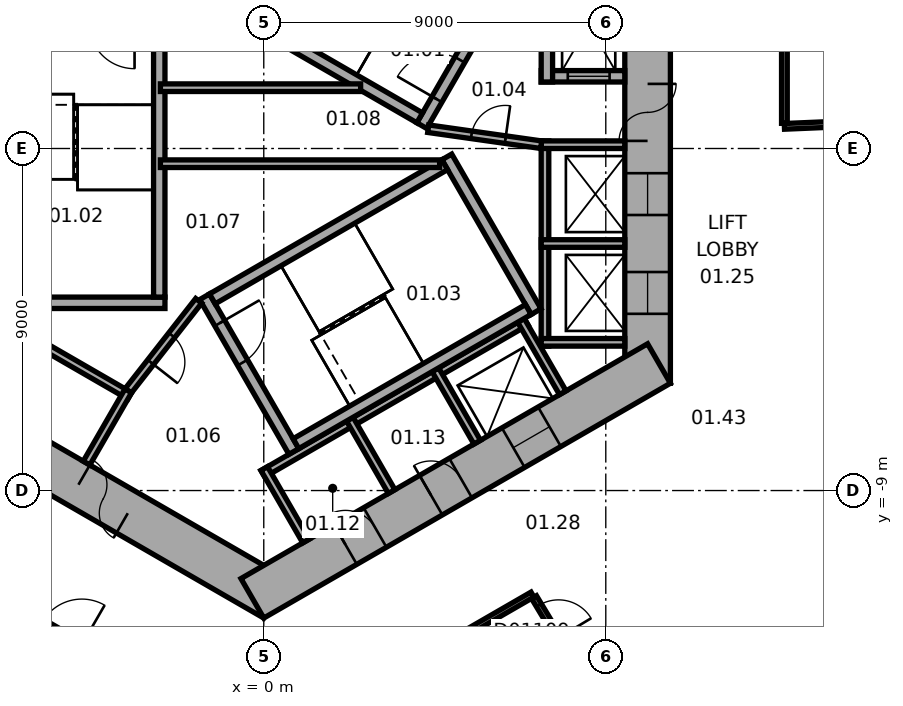
"""IFC4 building model, lengths in metres.
Left out: names, types, materials, properties, quantities, classifications, styles, units other than length and angle.
Written with IfcOpenShell. Run it as: python <this file> out.ifc"""

import sys

from ifc_helpers import new_model, si_unit, direction, frame, frame_2d, origin, place, context, subcontext, project, spatial, rectangle, extrude, element, fill, save


model = new_model("IFC4")
c1 = context("Model", 3, precision=1e-05, world=origin(), true_north=direction((0.0, 1.0)))
c2 = subcontext(c1, "Body", "Model", "MODEL_VIEW")
j1 = project(units=[si_unit("LENGTHUNIT", "METRE"), si_unit("PLANEANGLEUNIT", "RADIAN")], contexts=[c1])
p1 = place(None, origin())
s1 = spatial("IfcSite", under=j1, at=p1, CompositionType="ELEMENT")
p2 = place(p1, origin())
s2 = spatial("IfcBuilding", under=s1, at=p2, CompositionType="ELEMENT")
p3 = place(p2, frame((0.0, 0.0, 7.5)))
s3 = spatial("IfcBuildingStorey", under=s2, at=p3, CompositionType="ELEMENT", Elevation=7.5)
p4 = place(p3, frame((10.1, -6.177, 0.0), z_axis=(0.0, 0.0, 1.0), x_axis=(0.0, 1.0, 0.0)))
e1 = element("IfcWall", 1, at=p4, inside=s3, PredefinedType="SHEAR", context=c2, shape_type="SweptSolid", body=[
    extrude(rectangle(XDim=12.355, YDim=1.2, at=frame_2d((6.177, 0.0))), origin(), (0.0, 0.0, 1.0), 5.5),
])
p5 = place(p4, frame((6.378, 0.0, 0.0)))
e2 = element("IfcOpeningElement", 2, at=p5, cuts=e1, PredefinedType="OPENING", context=c2, shape_type="SweptSolid", body=[
    extrude(rectangle(XDim=1.5, YDim=2.1, at=frame_2d((0.75, 1.05))), frame((0.0, 0.61, 0.0), z_axis=(0.0, -1.0, 0.0), x_axis=(1.0, 0.0, 0.0)), (0.0, 0.0, 1.0), 1.22),
])
p6 = place(p4, frame((1.828, 0.0, 0.0)))
e3 = element("IfcOpeningElement", 3, at=p6, cuts=e1, PredefinedType="OPENING", context=c2, shape_type="SweptSolid", body=[
    extrude(rectangle(XDim=1.1, YDim=2.1, at=frame_2d((0.55, 1.05))), frame((0.0, 0.61, 0.0), z_axis=(0.0, -1.0, 0.0), x_axis=(1.0, 0.0, 0.0)), (0.0, 0.0, 1.0), 1.22),
])
p7 = place(p4, frame((4.427, 0.0, 0.0)))
e4 = element("IfcOpeningElement", 4, at=p7, cuts=e1, PredefinedType="OPENING", context=c2, shape_type="SweptSolid", body=[
    extrude(rectangle(XDim=1.1, YDim=2.1, at=frame_2d((0.55, 1.05))), frame((0.0, 0.61, 0.0), z_axis=(0.0, -1.0, 0.0), x_axis=(1.0, 0.0, 0.0)), (0.0, 0.0, 1.0), 1.22),
])
p8 = place(p3, frame((-10.4, -5.658, 0.0), z_axis=(0.0, 0.0, 1.0), x_axis=(0.866021384402, -0.500006961711, 0.0)))
e5 = element("IfcWall", 5, at=p8, inside=s3, PredefinedType="SHEAR", context=c2, shape_type="SweptSolid", body=[
    extrude(rectangle(XDim=12.355, YDim=1.2, at=frame_2d((6.178, 0.0))), origin(), (0.0, 0.0, 1.0), 5.5),
])
p9 = place(p8, frame((6.378, 0.0, 0.0)))
e6 = element("IfcOpeningElement", 6, at=p9, cuts=e5, PredefinedType="OPENING", context=c2, shape_type="SweptSolid", body=[
    extrude(rectangle(XDim=1.5, YDim=2.1, at=frame_2d((0.75, 1.05))), frame((0.0, 0.61, 0.0), z_axis=(0.0, -1.0, 0.0), x_axis=(1.0, 0.0, 0.0)), (0.0, 0.0, 1.0), 1.22),
])
p10 = place(p8, frame((3.228, 0.0, 0.0)))
e7 = element("IfcOpeningElement", 7, at=p10, cuts=e5, PredefinedType="OPENING", context=c2, shape_type="SweptSolid", body=[
    extrude(rectangle(XDim=0.9, YDim=2.1, at=frame_2d((0.45, 1.05))), frame((0.0, 0.61, 0.0), z_axis=(0.0, -1.0, 0.0), x_axis=(1.0, 0.0, 0.0)), (0.0, 0.0, 1.0), 1.22),
])
p11 = place(p3, frame((-0.3, -11.836, 0.0), z_axis=(0.0, 0.0, 1.0), x_axis=(0.866021384402, 0.500006961711, 0.0)))
e8 = element("IfcWall", 8, at=p11, inside=s3, PredefinedType="SHEAR", context=c2, shape_type="SweptSolid", body=[
    extrude(rectangle(XDim=12.355, YDim=1.2, at=frame_2d((6.178, 0.0))), origin(), (0.0, 0.0, 1.0), 5.5),
])
p12 = place(p11, frame((2.828, 0.0, 0.0)))
e9 = element("IfcOpeningElement", 9, at=p12, cuts=e8, PredefinedType="OPENING", context=c2, shape_type="SweptSolid", body=[
    extrude(rectangle(XDim=0.9, YDim=2.1, at=frame_2d((0.45, 1.05))), frame((0.0, 0.61, 0.0), z_axis=(0.0, -1.0, 0.0), x_axis=(1.0, 0.0, 0.0)), (0.0, 0.0, 1.0), 1.22),
])
p13 = place(p11, frame((5.428, 0.0, 0.0)))
e10 = element("IfcOpeningElement", 10, at=p13, cuts=e8, PredefinedType="OPENING", context=c2, shape_type="SweptSolid", body=[
    extrude(rectangle(XDim=0.9, YDim=2.1, at=frame_2d((0.45, 1.05))), frame((0.0, 0.61, 0.0), z_axis=(0.0, -1.0, 0.0), x_axis=(1.0, 0.0, 0.0)), (0.0, 0.0, 1.0), 1.22),
])
p14 = place(p11, frame((7.928, 0.0, 0.0)))
e11 = element("IfcOpeningElement", 11, at=p14, cuts=e8, PredefinedType="OPENING", context=c2, shape_type="SweptSolid", body=[
    extrude(rectangle(XDim=1.1, YDim=2.1, at=frame_2d((0.55, 1.05))), frame((0.0, 0.61, 0.0), z_axis=(0.0, -1.0, 0.0), x_axis=(1.0, 0.0, 0.0)), (0.0, 0.0, 1.0), 1.22),
])
p15 = place(p3, frame((7.4, -5.2, 0.0), z_axis=(0.0, 0.0, 1.0), x_axis=(0.0, 1.0, 0.0)))
e12 = element("IfcWall", 12, at=p15, inside=s3, PredefinedType="PARTITIONING", context=c2, shape_type="SweptSolid", body=[
    extrude(rectangle(XDim=5.4, YDim=0.2, at=frame_2d((2.7, 0.0))), origin(), (0.0, 0.0, 1.0), 5.2),
])
for number, where, z_axis, x_axis in (
    (13, (7.3, -5.1, 0.0), (0.0, 0.0, 1.0), (1.0, 0.0, 0.0)),
    (14, (7.3, -2.5, 0.0), (0.0, 0.0, 1.0), (1.0, 0.0, 0.0)),
    (15, (7.3, 0.1, 0.0), (0.0, 0.0, 1.0), (1.0, 0.0, 0.0)),
):
    element("IfcWall", number, at=place(p3, frame(where, z_axis=z_axis, x_axis=x_axis)), inside=s3, PredefinedType="PARTITIONING", context=c2, shape_type="SweptSolid", body=[
        extrude(rectangle(XDim=2.2, YDim=0.2, at=frame_2d((1.1, 0.0))), origin(), (0.0, 0.0, 1.0), 5.2),
    ])
p16 = place(p3, frame((-8.203, -3.809, 0.0), z_axis=(0.0, 0.0, 1.0), x_axis=(0.866028230842, -0.499995103361, 0.0)))
e16 = element("IfcWall", 16, at=p16, inside=s3, PredefinedType="PARTITIONING", context=c2, shape_type="SweptSolid", body=[
    extrude(rectangle(XDim=5.4, YDim=0.2, at=frame_2d((2.7, 0.0))), origin(), (0.0, 0.0, 1.0), 5.2),
])
p17 = place(p3, frame((-3.563, -6.372, 0.0), z_axis=(0.0, 0.0, 1.0), x_axis=(-0.499994660107, -0.866028486751, 0.0)))
e17 = element("IfcWall", 17, at=p17, inside=s3, PredefinedType="PARTITIONING", context=c2, shape_type="SweptSolid", body=[
    extrude(rectangle(XDim=2.2, YDim=0.2, at=frame_2d((1.1, 0.0))), origin(), (0.0, 0.0, 1.0), 5.2),
])
p18 = place(p3, frame((-0.024, -8.559, 0.0), z_axis=(0.0, 0.0, 1.0), x_axis=(0.866026010844, 0.49999894854, 0.0)))
e18 = element("IfcWall", 18, at=p18, inside=s3, PredefinedType="PARTITIONING", context=c2, shape_type="SweptSolid", body=[
    extrude(rectangle(XDim=8.0, YDim=0.2, at=frame_2d((4.0, 0.0))), origin(), (0.0, 0.0, 1.0), 5.2),
])
for number, where, z_axis, x_axis in (
    (19, (0.013, -8.422, 0.0), (0.0, 0.0, 1.0), (0.5, -0.866, 0.0)),
    (20, (2.264, -7.122, 0.0), (0.0, 0.0, 1.0), (0.5, -0.866, 0.0)),
    (21, (4.516, -5.822, 0.0), (0.0, 0.0, 1.0), (0.5, -0.866, 0.0)),
    (22, (6.768, -4.522, 0.0), (0.0, 0.0, 1.0), (0.5, -0.866, 0.0)),
):
    element("IfcWall", number, at=place(p3, frame(where, z_axis=z_axis, x_axis=x_axis)), inside=s3, PredefinedType="PARTITIONING", context=c2, shape_type="SweptSolid", body=[
        extrude(rectangle(XDim=2.2, YDim=0.2, at=frame_2d((1.1, 0.0))), origin(), (0.0, 0.0, 1.0), 5.2),
    ])
p19 = place(p3, frame((4.158, 0.602, 0.0), z_axis=(0.0, 0.0, 1.0), x_axis=(0.499977259774, 0.866038532462, 0.0)))
e23 = element("IfcWall", 23, at=p19, inside=s3, PredefinedType="SHEAR", context=c2, shape_type="SweptSolid", body=[
    extrude(rectangle(XDim=4.7, YDim=0.3, at=frame_2d((2.35, 0.0))), origin(), (0.0, 0.0, 1.0), 5.2),
])
p20 = place(p19, frame((0.8, 0.0, 0.0)))
e24 = element("IfcOpeningElement", 24, at=p20, cuts=e23, PredefinedType="OPENING", context=c2, shape_type="SweptSolid", body=[
    extrude(rectangle(XDim=1.2, YDim=2.1, at=frame_2d((0.6, 1.05))), frame((0.0, 0.16, 0.0), z_axis=(0.0, -1.0, 0.0), x_axis=(1.0, 0.0, 0.0)), (0.0, 0.0, 1.0), 0.32),
])
p21 = place(p3, frame((4.103, 0.807, 0.0), z_axis=(0.0, 0.0, 1.0), x_axis=(-0.866027801685, 0.499995846692, 0.0)))
e25 = element("IfcWall", 25, at=p21, inside=s3, PredefinedType="SHEAR", context=c2, shape_type="SweptSolid", body=[
    extrude(rectangle(XDim=7.06, YDim=0.3, at=frame_2d((3.53, 0.0))), origin(), (0.0, 0.0, 1.0), 5.2),
])
p22 = place(p3, frame((-2.6, -4.06, 0.0), z_axis=(0.0, 0.0, 1.0), x_axis=(-1.0, 0.0, 0.0)))
e26 = element("IfcWall", 26, at=p22, inside=s3, PredefinedType="SHEAR", context=c2, shape_type="SweptSolid", body=[
    extrude(rectangle(XDim=4.7, YDim=0.3, at=frame_2d((2.35, 0.0))), origin(), (0.0, 0.0, 1.0), 5.2),
])
p23 = place(p3, frame((-2.75, 3.15, 0.0), z_axis=(0.0, 0.0, 1.0), x_axis=(0.0, -1.0, 0.0)))
e27 = element("IfcWall", 27, at=p23, inside=s3, PredefinedType="SHEAR", context=c2, shape_type="SweptSolid", body=[
    extrude(rectangle(XDim=7.06, YDim=0.3, at=frame_2d((3.53, 0.0))), origin(), (0.0, 0.0, 1.0), 5.2),
])
p24 = place(p3, frame((-1.558, -3.902, 0.0), z_axis=(0.0, 0.0, 1.0), x_axis=(0.499977259774, -0.866038532462, 0.0)))
e28 = element("IfcWall", 28, at=p24, inside=s3, PredefinedType="SHEAR", context=c2, shape_type="SweptSolid", body=[
    extrude(rectangle(XDim=4.7, YDim=0.3, at=frame_2d((2.35, 0.0))), origin(), (0.0, 0.0, 1.0), 5.2),
])
p25 = place(p24, frame((0.8, 0.0, 0.0)))
e29 = element("IfcOpeningElement", 29, at=p25, cuts=e28, PredefinedType="OPENING", context=c2, shape_type="SweptSolid", body=[
    extrude(rectangle(XDim=1.2, YDim=2.1, at=frame_2d((0.6, 1.05))), frame((0.0, 0.16, 0.0), z_axis=(0.0, -1.0, 0.0), x_axis=(1.0, 0.0, 0.0)), (0.0, 0.0, 1.0), 0.32),
])
p26 = place(p3, frame((4.816, -0.222, 0.0), z_axis=(0.0, 0.0, 1.0), x_axis=(0.499977259774, -0.866038532462, 0.0)))
e30 = element("IfcWall", 30, at=p26, inside=s3, PredefinedType="SHEAR", context=c2, shape_type="SweptSolid", body=[
    extrude(rectangle(XDim=4.7, YDim=0.3, at=frame_2d((2.35, 0.0))), origin(), (0.0, 0.0, 1.0), 5.2),
])
for number, where, z_axis, x_axis in (
    (31, (-1.353, -3.957, 0.0), (0.0, 0.0, 1.0), (0.866, 0.5, 0.0)),
    (32, (0.847, -7.767, 0.0), (0.0, 0.0, 1.0), (0.866, 0.5, 0.0)),
):
    element("IfcWall", number, at=place(p3, frame(where, z_axis=z_axis, x_axis=x_axis)), inside=s3, PredefinedType="SHEAR", context=c2, shape_type="SweptSolid", body=[
        extrude(rectangle(XDim=7.06, YDim=0.3, at=frame_2d((3.53, 0.0))), origin(), (0.0, 0.0, 1.0), 5.2),
    ])
p27 = place(p3, frame((7.3, 1.9, 0.0), z_axis=(0.0, 0.0, 1.0), x_axis=(1.0, 0.0, 0.0)))
e33 = element("IfcWall", 33, at=p27, inside=s3, PredefinedType="SHEAR", context=c2, shape_type="SweptSolid", body=[
    extrude(rectangle(XDim=2.2, YDim=0.3, at=frame_2d((1.1, 0.0))), origin(), (0.0, 0.0, 1.0), 5.2),
])
p28 = place(p27, frame((0.7, 0.0, 0.0)))
e34 = element("IfcOpeningElement", 34, at=p28, cuts=e33, PredefinedType="OPENING", context=c2, shape_type="SweptSolid", body=[
    extrude(rectangle(XDim=1.1, YDim=2.1, at=frame_2d((0.55, 1.05))), frame((0.0, 0.16, 0.0), z_axis=(0.0, -1.0, 0.0), x_axis=(1.0, 0.0, 0.0)), (0.0, 0.0, 1.0), 0.32),
])
p29 = place(p3, frame((7.45, 1.75, 0.0), z_axis=(0.0, 0.0, 1.0), x_axis=(0.0, 1.0, 0.0)))
e35 = element("IfcWall", 35, at=p29, inside=s3, PredefinedType="SHEAR", context=c2, shape_type="SweptSolid", body=[
    extrude(rectangle(XDim=3.35, YDim=0.3, at=frame_2d((1.675, 0.0))), origin(), (0.0, 0.0, 1.0), 5.2),
])
p30 = place(p3, frame((4.327, 0.521, 0.0), z_axis=(0.0, 0.0, 1.0), x_axis=(0.990124376366, -0.14019172346, 0.0)))
e36 = element("IfcWall", 36, at=p30, inside=s3, PredefinedType="PARTITIONING", context=c2, shape_type="SweptSolid", body=[
    extrude(rectangle(XDim=3.002, YDim=0.2, at=frame_2d((1.501, 0.0))), origin(), (0.0, 0.0, 1.0), 5.2),
])
p31 = place(p30, frame((1.15, 0.0, 0.0)))
e37 = element("IfcOpeningElement", 37, at=p31, cuts=e36, PredefinedType="OPENING", context=c2, shape_type="SweptSolid", body=[
    extrude(rectangle(XDim=0.9, YDim=2.1, at=frame_2d((0.45, 1.05))), frame((0.0, 0.11, 0.0), z_axis=(0.0, -1.0, 0.0), x_axis=(1.0, 0.0, 0.0)), (0.0, 0.0, 1.0), 0.22),
])
p32 = place(p3, frame((-1.712, -4.008, 0.0), z_axis=(0.0, 0.0, 1.0), x_axis=(-0.616549420702, -0.787316208287, 0.0)))
e38 = element("IfcWall", 38, at=p32, inside=s3, PredefinedType="PARTITIONING", context=c2, shape_type="SweptSolid", body=[
    extrude(rectangle(XDim=3.002, YDim=0.2, at=frame_2d((1.501, 0.0))), origin(), (0.0, 0.0, 1.0), 5.2),
])
p33 = place(p32, frame((1.15, 0.0, 0.0)))
e39 = element("IfcOpeningElement", 39, at=p33, cuts=e38, PredefinedType="OPENING", context=c2, shape_type="SweptSolid", body=[
    extrude(rectangle(XDim=0.9, YDim=2.1, at=frame_2d((0.45, 1.05))), frame((0.0, 0.11, 0.0), z_axis=(0.0, -1.0, 0.0), x_axis=(1.0, 0.0, 0.0)), (0.0, 0.0, 1.0), 0.22),
])
p34 = place(p3, frame((-2.72, -0.4, 0.0), z_axis=(0.0, 0.0, 1.0), x_axis=(1.0, 0.0, 0.0)))
e40 = element("IfcWall", 40, at=p34, inside=s3, PredefinedType="PARTITIONING", context=c2, shape_type="SweptSolid", body=[
    extrude(rectangle(XDim=7.347, YDim=0.2, at=frame_2d((3.674, 0.0))), origin(), (0.0, 0.0, 1.0), 5.2),
])
p35 = place(p3, frame((-2.72, 1.6, 0.0), z_axis=(0.0, 0.0, 1.0), x_axis=(1.0, 0.0, 0.0)))
e41 = element("IfcWall", 41, at=p35, inside=s3, PredefinedType="PARTITIONING", context=c2, shape_type="SweptSolid", body=[
    extrude(rectangle(XDim=5.269, YDim=0.2, at=frame_2d((2.634, 0.0))), origin(), (0.0, 0.0, 1.0), 5.2),
])
p36 = place(p3, frame((10.924, -18.133, 0.0), z_axis=(0.0, 0.0, 1.0), x_axis=(-0.516035715917, 0.856567066784, 0.0)))
e42 = element("IfcWall", 42, at=p36, inside=s3, PredefinedType="PARTITIONING", context=c2, shape_type="SweptSolid", body=[
    extrude(rectangle(XDim=7.387, YDim=0.15, at=frame_2d((3.693, 0.0))), origin(), (0.0, 0.0, 1.0), 5.2),
])
p37 = place(p36, frame((6.137, 0.0, 0.0)))
e43 = element("IfcOpeningElement", 43, at=p37, cuts=e42, PredefinedType="OPENING", context=c2, shape_type="SweptSolid", body=[
    extrude(rectangle(XDim=1.0, YDim=2.1, at=frame_2d((0.5, 1.05))), frame((0.0, 0.085, 0.0), z_axis=(0.0, -1.0, 0.0), x_axis=(1.0, 0.0, 0.0)), (0.0, 0.0, 1.0), 0.17),
])
p38 = place(p3, frame((0.0, -15.82, 0.0), z_axis=(0.0, 0.0, 1.0), x_axis=(-0.866018019704, 0.500012789385, 0.0)))
e44 = element("IfcWall", 44, at=p38, inside=s3, PredefinedType="PARTITIONING", context=c2, shape_type="SweptSolid", body=[
    extrude(rectangle(XDim=7.327, YDim=0.15, at=frame_2d((3.664, 0.0))), origin(), (0.0, 0.0, 1.0), 5.2),
])
p39 = place(p38, frame((5.527, 0.0, 0.0)))
e45 = element("IfcOpeningElement", 45, at=p39, cuts=e44, PredefinedType="OPENING", context=c2, shape_type="SweptSolid", body=[
    extrude(rectangle(XDim=1.2, YDim=2.1, at=frame_2d((0.6, 1.05))), frame((0.0, 0.085, 0.0), z_axis=(0.0, -1.0, 0.0), x_axis=(1.0, 0.0, 0.0)), (0.0, 0.0, 1.0), 0.17),
])
p40 = place(p3, frame((0.475, -15.545, 0.0), z_axis=(0.0, 0.0, 1.0), x_axis=(0.866021168401, 0.500007335828, 0.0)))
e46 = element("IfcWall", 46, at=p40, inside=s3, PredefinedType="PARTITIONING", context=c2, shape_type="SweptSolid", body=[
    extrude(rectangle(XDim=7.616, YDim=0.15, at=frame_2d((3.808, 0.0))), origin(), (0.0, 0.0, 1.0), 5.2),
])
p41 = place(p3, frame((21.15, 0.899, 0.0), z_axis=(0.0, 0.0, 1.0), x_axis=(-0.999097940345, -0.04246534585, 0.0)))
e47 = element("IfcWall", 47, at=p41, inside=s3, PredefinedType="PARTITIONING", context=c2, shape_type="SweptSolid", body=[
    extrude(rectangle(XDim=7.457, YDim=0.15, at=frame_2d((3.729, 0.0))), origin(), (0.0, 0.0, 1.0), 5.2),
])
p42 = place(p3, frame((13.7, 7.85, 0.0), z_axis=(0.0, 0.0, 1.0), x_axis=(0.0, -1.0, 0.0)))
e48 = element("IfcWall", 48, at=p42, inside=s3, PredefinedType="PARTITIONING", context=c2, shape_type="SweptSolid", body=[
    extrude(rectangle(XDim=7.187, YDim=0.15, at=frame_2d((3.594, 0.0))), origin(), (0.0, 0.0, 1.0), 5.2),
])
p43 = place(p5, origin())
e49 = element("IfcDoor", 49, at=p43, inside=s3, OperationType="DOUBLE_DOOR_SINGLE_SWING", PredefinedType="DOOR", context=c2, shape_type="SweptSolid", body=[
    extrude(rectangle(XDim=1.5, YDim=2.1, at=frame_2d((0.75, 1.05))), frame((0.0, 0.025, 0.0), z_axis=(0.0, -1.0, 0.0), x_axis=(1.0, 0.0, 0.0)), (0.0, 0.0, 1.0), 0.05),
])
fill(e2, e49)
p44 = place(p9, origin())
e50 = element("IfcDoor", 50, at=p44, inside=s3, OperationType="DOUBLE_DOOR_SINGLE_SWING", PredefinedType="DOOR", context=c2, shape_type="SweptSolid", body=[
    extrude(rectangle(XDim=1.5, YDim=2.1, at=frame_2d((0.75, 1.05))), frame((0.0, 0.025, 0.0), z_axis=(0.0, -1.0, 0.0), x_axis=(1.0, 0.0, 0.0)), (0.0, 0.0, 1.0), 0.05),
])
fill(e6, e50)
p45 = place(p20, origin())
e51 = element("IfcDoor", 51, at=p45, inside=s3, OperationType="SINGLE_SWING_RIGHT", PredefinedType="DOOR", context=c2, shape_type="SweptSolid", body=[
    extrude(rectangle(XDim=1.2, YDim=2.1, at=frame_2d((0.6, 1.05))), frame((0.0, 0.025, 0.0), z_axis=(0.0, -1.0, 0.0), x_axis=(1.0, 0.0, 0.0)), (0.0, 0.0, 1.0), 0.05),
])
fill(e24, e51)
p46 = place(p25, origin())
e52 = element("IfcDoor", 52, at=p46, inside=s3, OperationType="SINGLE_SWING_RIGHT", PredefinedType="DOOR", context=c2, shape_type="SweptSolid", body=[
    extrude(rectangle(XDim=1.2, YDim=2.1, at=frame_2d((0.6, 1.05))), frame((0.0, 0.025, 0.0), z_axis=(0.0, -1.0, 0.0), x_axis=(1.0, 0.0, 0.0)), (0.0, 0.0, 1.0), 0.05),
])
fill(e29, e52)
p47 = place(p31, origin())
e53 = element("IfcDoor", 53, at=p47, inside=s3, OperationType="SINGLE_SWING_LEFT", PredefinedType="DOOR", context=c2, shape_type="SweptSolid", body=[
    extrude(rectangle(XDim=0.9, YDim=2.1, at=frame_2d((0.45, 1.05))), frame((0.0, 0.025, 0.0), z_axis=(0.0, -1.0, 0.0), x_axis=(1.0, 0.0, 0.0)), (0.0, 0.0, 1.0), 0.05),
])
fill(e37, e53)
p48 = place(p33, origin())
e54 = element("IfcDoor", 54, at=p48, inside=s3, OperationType="SINGLE_SWING_LEFT", PredefinedType="DOOR", context=c2, shape_type="SweptSolid", body=[
    extrude(rectangle(XDim=0.9, YDim=2.1, at=frame_2d((0.45, 1.05))), frame((0.0, 0.025, 0.0), z_axis=(0.0, -1.0, 0.0), x_axis=(1.0, 0.0, 0.0)), (0.0, 0.0, 1.0), 0.05),
])
fill(e39, e54)
p49 = place(p12, origin())
e55 = element("IfcDoor", 55, at=p49, inside=s3, OperationType="SINGLE_SWING_LEFT", PredefinedType="DOOR", context=c2, shape_type="SweptSolid", body=[
    extrude(rectangle(XDim=0.9, YDim=2.1, at=frame_2d((0.45, 1.05))), frame((0.0, 0.025, 0.0), z_axis=(0.0, -1.0, 0.0), x_axis=(1.0, 0.0, 0.0)), (0.0, 0.0, 1.0), 0.05),
])
fill(e9, e55)
p50 = place(p13, origin())
e56 = element("IfcDoor", 56, at=p50, inside=s3, OperationType="SINGLE_SWING_LEFT", PredefinedType="DOOR", context=c2, shape_type="SweptSolid", body=[
    extrude(rectangle(XDim=0.9, YDim=2.1, at=frame_2d((0.45, 1.05))), frame((0.0, 0.025, 0.0), z_axis=(0.0, -1.0, 0.0), x_axis=(1.0, 0.0, 0.0)), (0.0, 0.0, 1.0), 0.05),
])
fill(e10, e56)
p51 = place(p28, origin())
e57 = element("IfcDoor", 57, at=p51, inside=s3, OperationType="DOUBLE_DOOR_SLIDING", PredefinedType="DOOR", context=c2, shape_type="SweptSolid", body=[
    extrude(rectangle(XDim=1.1, YDim=2.1, at=frame_2d((0.55, 1.05))), frame((0.0, 0.025, 0.0), z_axis=(0.0, -1.0, 0.0), x_axis=(1.0, 0.0, 0.0)), (0.0, 0.0, 1.0), 0.05),
])
fill(e34, e57)
p52 = place(p6, origin())
e58 = element("IfcDoor", 58, at=p52, inside=s3, OperationType="DOUBLE_DOOR_SLIDING", PredefinedType="DOOR", context=c2, shape_type="SweptSolid", body=[
    extrude(rectangle(XDim=1.1, YDim=2.1, at=frame_2d((0.55, 1.05))), frame((0.0, 0.025, 0.0), z_axis=(0.0, -1.0, 0.0), x_axis=(1.0, 0.0, 0.0)), (0.0, 0.0, 1.0), 0.05),
])
fill(e3, e58)
p53 = place(p7, origin())
e59 = element("IfcDoor", 59, at=p53, inside=s3, OperationType="DOUBLE_DOOR_SLIDING", PredefinedType="DOOR", context=c2, shape_type="SweptSolid", body=[
    extrude(rectangle(XDim=1.1, YDim=2.1, at=frame_2d((0.55, 1.05))), frame((0.0, 0.025, 0.0), z_axis=(0.0, -1.0, 0.0), x_axis=(1.0, 0.0, 0.0)), (0.0, 0.0, 1.0), 0.05),
])
fill(e4, e59)
p54 = place(p14, origin())
e60 = element("IfcDoor", 60, at=p54, inside=s3, OperationType="DOUBLE_DOOR_SLIDING", PredefinedType="DOOR", context=c2, shape_type="SweptSolid", body=[
    extrude(rectangle(XDim=1.1, YDim=2.1, at=frame_2d((0.55, 1.05))), frame((0.0, 0.025, 0.0), z_axis=(0.0, -1.0, 0.0), x_axis=(1.0, 0.0, 0.0)), (0.0, 0.0, 1.0), 0.05),
])
fill(e11, e60)
p55 = place(p37, origin())
e61 = element("IfcDoor", 61, at=p55, inside=s3, OperationType="SINGLE_SWING_LEFT", PredefinedType="DOOR", context=c2, shape_type="SweptSolid", body=[
    extrude(rectangle(XDim=1.0, YDim=2.1, at=frame_2d((0.5, 1.05))), frame((0.0, 0.025, 0.0), z_axis=(0.0, -1.0, 0.0), x_axis=(1.0, 0.0, 0.0)), (0.0, 0.0, 1.0), 0.05),
])
fill(e43, e61)
p56 = place(p39, origin())
e62 = element("IfcDoor", 62, at=p56, inside=s3, OperationType="SINGLE_SWING_LEFT", PredefinedType="DOOR", context=c2, shape_type="SweptSolid", body=[
    extrude(rectangle(XDim=1.2, YDim=2.1, at=frame_2d((0.6, 1.05))), frame((0.0, 0.025, 0.0), z_axis=(0.0, -1.0, 0.0), x_axis=(1.0, 0.0, 0.0)), (0.0, 0.0, 1.0), 0.05),
])
fill(e45, e62)
save(model, sys.argv[1])
